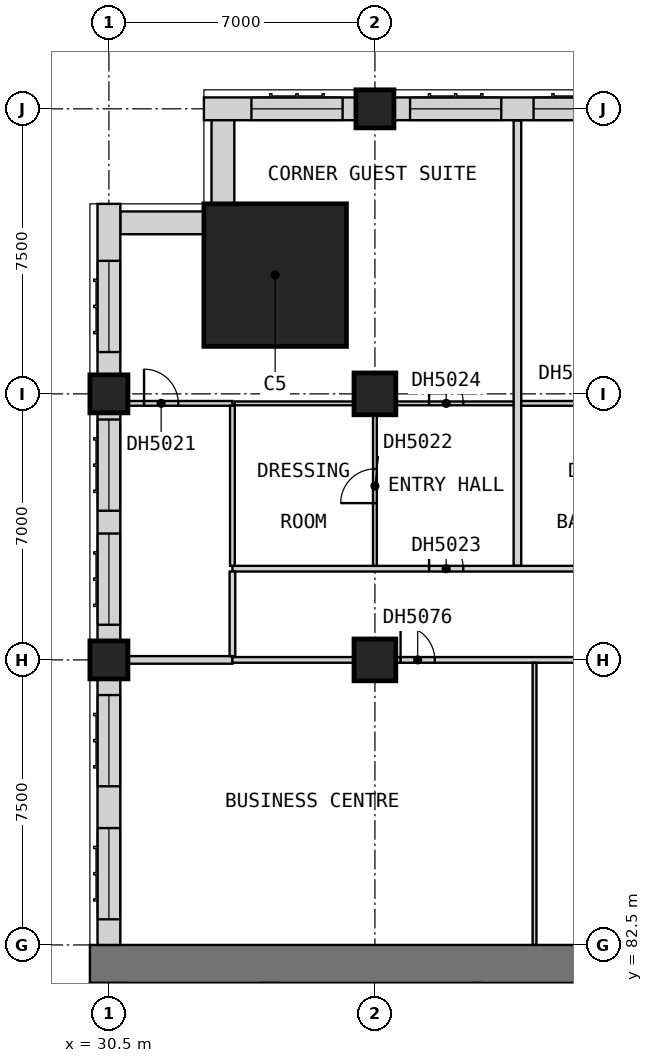
"""IFC4 building model, lengths in metres.
Left out: names, types, materials, properties, quantities, classifications, styles, units other than length and angle.
Written with IfcOpenShell. Run it as: python <this file> out.ifc"""

import sys

from ifc_helpers import new_model, si_unit, direction, frame, frame_2d, origin, origin_2d, place, context, subcontext, project, spatial, rectangle, extrude, element, fill, save


model = new_model("IFC4")
c1 = context("Model", 3, precision=1e-05, world=origin(), true_north=direction((0.0, 1.0)))
c2 = subcontext(c1, "Body", "Model", "MODEL_VIEW")
j1 = project(units=[si_unit("LENGTHUNIT", "METRE"), si_unit("PLANEANGLEUNIT", "RADIAN")], contexts=[c1])
p1 = place(None, origin())
s1 = spatial("IfcSite", under=j1, at=p1, CompositionType="ELEMENT")
p2 = place(p1, origin())
s2 = spatial("IfcBuilding", under=s1, at=p2, CompositionType="ELEMENT")
p3 = place(p2, frame((0.0, 0.0, 93.5)))
s3 = spatial("IfcBuildingStorey", under=s2, at=p3, CompositionType="ELEMENT", Elevation=93.5)
for number, where, z_axis, x_axis in (
    (1, (30.5, 90.0, 0.0), (0.0, 0.0, 1.0), (1.0, 0.0, 0.0)),
    (2, (30.5, 97.0, 0.0), (0.0, 0.0, 1.0), (1.0, 0.0, 0.0)),
):
    element("IfcColumn", number, at=place(p3, frame(where, z_axis=z_axis, x_axis=x_axis)), inside=s3, PredefinedType="COLUMN", context=c2, shape_type="SweptSolid", body=[
        extrude(rectangle(XDim=1.0, YDim=1.0, at=origin_2d()), origin(), (0.0, 0.0, 1.0), 3.6),
    ])
for number, where, z_axis, x_axis in (
    (3, (37.5, 90.0, 0.0), (0.0, 0.0, 1.0), (1.0, 0.0, 0.0)),
    (4, (37.5, 97.0, 0.0), (0.0, 0.0, 1.0), (1.0, 0.0, 0.0)),
):
    element("IfcColumn", number, at=place(p3, frame(where, z_axis=z_axis, x_axis=x_axis)), inside=s3, PredefinedType="COLUMN", context=c2, shape_type="SweptSolid", body=[
        extrude(rectangle(XDim=1.1, YDim=1.1, at=origin_2d()), origin(), (0.0, 0.0, 1.0), 3.6),
    ])
p4 = place(p3, frame((37.5, 104.5, 0.0), z_axis=(0.0, 0.0, 1.0), x_axis=(1.0, 0.0, 0.0)))
e5 = element("IfcColumn", 5, at=p4, inside=s3, PredefinedType="COLUMN", context=c2, shape_type="SweptSolid", body=[
    extrude(rectangle(XDim=1.0, YDim=1.0, at=origin_2d()), origin(), (0.0, 0.0, 1.0), 3.6),
])
p5 = place(p3, frame((34.875, 100.125, 0.0), z_axis=(0.0, 0.0, 1.0), x_axis=(1.0, 0.0, 0.0)))
e6 = element("IfcColumn", 6, at=p5, inside=s3, PredefinedType="COLUMN", context=c2, shape_type="SweptSolid", body=[
    extrude(rectangle(XDim=3.75, YDim=3.75, at=origin_2d()), origin(), (0.0, 0.0, 1.0), 3.6),
])
p6 = place(p3, frame((30.0, 82.0, 0.0), z_axis=(0.0, 0.0, 1.0), x_axis=(1.0, 0.0, 0.0)))
e7 = element("IfcWall", 7, at=p6, inside=s3, PredefinedType="SHEAR", context=c2, shape_type="SweptSolid", body=[
    extrude(rectangle(XDim=30.0, YDim=1.0, at=frame_2d((15.0, 0.0))), origin(), (0.0, 0.0, 1.0), 3.6),
])
p7 = place(p3, frame((34.75, 78.3, 0.0), z_axis=(0.0, 0.0, 1.0), x_axis=(0.0, 1.0, 0.0)))
e8 = element("IfcWall", 8, at=p7, inside=s3, PredefinedType="SHEAR", context=c2, shape_type="SweptSolid", body=[
    extrude(rectangle(XDim=3.2, YDim=0.5, at=frame_2d((1.6, 0.0))), origin(), (0.0, 0.0, 1.0), 3.6),
])
p8 = place(p3, frame((44.5, 104.5, 0.0), z_axis=(0.0, 0.0, 1.0), x_axis=(-1.0, 0.0, 0.0)))
e9 = element("IfcWall", 9, at=p8, inside=s3, PredefinedType="SOLIDWALL", context=c2, shape_type="SweptSolid", body=[
    extrude(rectangle(XDim=6.5, YDim=0.6, at=frame_2d((3.25, 0.0))), origin(), (0.0, 0.0, 1.0), 2.85),
])
p9 = place(p8, frame((3.675, 0.0, 0.8)))
e10 = element("IfcOpeningElement", 10, at=p9, cuts=e9, PredefinedType="OPENING", context=c2, shape_type="SweptSolid", body=[
    extrude(rectangle(XDim=2.4, YDim=1.8, at=frame_2d((1.2, 0.9))), frame((0.0, 0.31, 0.0), z_axis=(0.0, -1.0, 0.0), x_axis=(1.0, 0.0, 0.0)), (0.0, 0.0, 1.0), 0.62),
])
p10 = place(p8, frame((0.425, 0.0, 0.8)))
e11 = element("IfcOpeningElement", 11, at=p10, cuts=e9, PredefinedType="OPENING", context=c2, shape_type="SweptSolid", body=[
    extrude(rectangle(XDim=2.4, YDim=1.8, at=frame_2d((1.2, 0.9))), frame((0.0, 0.31, 0.0), z_axis=(0.0, -1.0, 0.0), x_axis=(1.0, 0.0, 0.0)), (0.0, 0.0, 1.0), 0.62),
])
p11 = place(p3, frame((37.0, 104.5, 0.0), z_axis=(0.0, 0.0, 1.0), x_axis=(-1.0, 0.0, 0.0)))
e12 = element("IfcWall", 12, at=p11, inside=s3, PredefinedType="SOLIDWALL", context=c2, shape_type="SweptSolid", body=[
    extrude(rectangle(XDim=4.0, YDim=0.6, at=frame_2d((2.0, 0.0))), origin(), (0.0, 0.0, 1.0), 3.35),
])
p12 = place(p11, frame((0.35, 0.0, 0.8)))
e13 = element("IfcOpeningElement", 13, at=p12, cuts=e12, PredefinedType="OPENING", context=c2, shape_type="SweptSolid", body=[
    extrude(rectangle(XDim=2.4, YDim=1.8, at=frame_2d((1.2, 0.9))), frame((0.0, 0.31, 0.0), z_axis=(0.0, -1.0, 0.0), x_axis=(1.0, 0.0, 0.0)), (0.0, 0.0, 1.0), 0.62),
])
for number, where, z_axis, x_axis in (
    (14, (33.5, 104.2, 0.0), (0.0, 0.0, 1.0), (0.0, -1.0, 0.0)),
    (15, (33.0, 101.5, 0.0), (0.0, 0.0, 1.0), (-1.0, 0.0, 0.0)),
):
    element("IfcWall", number, at=place(p3, frame(where, z_axis=z_axis, x_axis=x_axis)), inside=s3, PredefinedType="SOLIDWALL", context=c2, shape_type="SweptSolid", body=[
        extrude(rectangle(XDim=2.2, YDim=0.6, at=frame_2d((1.1, 0.0))), origin(), (0.0, 0.0, 1.0), 3.35),
    ])
p13 = place(p3, frame((30.5, 102.0, 0.0), z_axis=(0.0, 0.0, 1.0), x_axis=(0.0, -1.0, 0.0)))
e16 = element("IfcWall", 16, at=p13, inside=s3, PredefinedType="SOLIDWALL", context=c2, shape_type="SweptSolid", body=[
    extrude(rectangle(XDim=4.5, YDim=0.6, at=frame_2d((2.25, 0.0))), origin(), (0.0, 0.0, 1.0), 2.85),
])
p14 = place(p13, frame((1.5, 0.0, 0.8)))
e17 = element("IfcOpeningElement", 17, at=p14, cuts=e16, PredefinedType="OPENING", context=c2, shape_type="SweptSolid", body=[
    extrude(rectangle(XDim=2.4, YDim=1.8, at=frame_2d((1.2, 0.9))), frame((0.0, 0.31, 0.0), z_axis=(0.0, -1.0, 0.0), x_axis=(1.0, 0.0, 0.0)), (0.0, 0.0, 1.0), 0.62),
])
p15 = place(p3, frame((30.5, 96.5, 0.0), z_axis=(0.0, 0.0, 1.0), x_axis=(0.0, -1.0, 0.0)))
e18 = element("IfcWall", 18, at=p15, inside=s3, PredefinedType="SOLIDWALL", context=c2, shape_type="SweptSolid", body=[
    extrude(rectangle(XDim=6.0, YDim=0.6, at=frame_2d((3.0, 0.0))), origin(), (0.0, 0.0, 1.0), 2.85),
])
p16 = place(p15, frame((3.175, 0.0, 0.8)))
e19 = element("IfcOpeningElement", 19, at=p16, cuts=e18, PredefinedType="OPENING", context=c2, shape_type="SweptSolid", body=[
    extrude(rectangle(XDim=2.4, YDim=1.8, at=frame_2d((1.2, 0.9))), frame((0.0, 0.31, 0.0), z_axis=(0.0, -1.0, 0.0), x_axis=(1.0, 0.0, 0.0)), (0.0, 0.0, 1.0), 0.62),
])
p17 = place(p15, frame((0.175, 0.0, 0.8)))
e20 = element("IfcOpeningElement", 20, at=p17, cuts=e18, PredefinedType="OPENING", context=c2, shape_type="SweptSolid", body=[
    extrude(rectangle(XDim=2.4, YDim=1.8, at=frame_2d((1.2, 0.9))), frame((0.0, 0.31, 0.0), z_axis=(0.0, -1.0, 0.0), x_axis=(1.0, 0.0, 0.0)), (0.0, 0.0, 1.0), 0.62),
])
p18 = place(p3, frame((30.5, 89.5, 0.0), z_axis=(0.0, 0.0, 1.0), x_axis=(0.0, -1.0, 0.0)))
e21 = element("IfcWall", 21, at=p18, inside=s3, PredefinedType="SOLIDWALL", context=c2, shape_type="SweptSolid", body=[
    extrude(rectangle(XDim=7.0, YDim=0.6, at=frame_2d((3.5, 0.0))), origin(), (0.0, 0.0, 1.0), 3.35),
])
p19 = place(p18, frame((3.925, 0.0, 0.8)))
e22 = element("IfcOpeningElement", 22, at=p19, cuts=e21, PredefinedType="OPENING", context=c2, shape_type="SweptSolid", body=[
    extrude(rectangle(XDim=2.4, YDim=1.8, at=frame_2d((1.2, 0.9))), frame((0.0, 0.31, 0.0), z_axis=(0.0, -1.0, 0.0), x_axis=(1.0, 0.0, 0.0)), (0.0, 0.0, 1.0), 0.62),
])
p20 = place(p18, frame((0.425, 0.0, 0.8)))
e23 = element("IfcOpeningElement", 23, at=p20, cuts=e21, PredefinedType="OPENING", context=c2, shape_type="SweptSolid", body=[
    extrude(rectangle(XDim=2.4, YDim=1.8, at=frame_2d((1.2, 0.9))), frame((0.0, 0.31, 0.0), z_axis=(0.0, -1.0, 0.0), x_axis=(1.0, 0.0, 0.0)), (0.0, 0.0, 1.0), 0.62),
])
p21 = place(p3, frame((30.0, 90.0, 0.0), z_axis=(0.0, 0.0, 1.0), x_axis=(1.0, 0.0, 0.0)))
e24 = element("IfcWall", 24, at=p21, inside=s3, PredefinedType="PARTITIONING", context=c2, shape_type="SweptSolid", body=[
    extrude(rectangle(XDim=3.75, YDim=0.2, at=frame_2d((1.875, 0.0))), origin(), (0.0, 0.0, 1.0), 3.35),
])
p22 = place(p3, frame((41.25, 92.475, 0.0), z_axis=(0.0, 0.0, 1.0), x_axis=(0.0, 1.0, 0.0)))
e25 = element("IfcWall", 25, at=p22, inside=s3, PredefinedType="PARTITIONING", context=c2, shape_type="SweptSolid", body=[
    extrude(rectangle(XDim=11.715, YDim=0.2, at=frame_2d((5.857, 0.0))), origin(), (0.0, 0.0, 1.0), 3.35),
])
p23 = place(p3, frame((33.75, 90.0, 0.0), z_axis=(0.0, 0.0, 1.0), x_axis=(1.0, 0.0, 0.0)))
e26 = element("IfcWall", 26, at=p23, inside=s3, PredefinedType="PARTITIONING", context=c2, shape_type="SweptSolid", body=[
    extrude(rectangle(XDim=41.25, YDim=0.15, at=frame_2d((20.625, 0.0))), origin(), (0.0, 0.0, 1.0), 3.35),
])
p24 = place(p23, frame((4.425, 0.0, 0.0)))
e27 = element("IfcOpeningElement", 27, at=p24, cuts=e26, PredefinedType="OPENING", context=c2, shape_type="SweptSolid", body=[
    extrude(rectangle(XDim=0.9, YDim=2.1, at=frame_2d((0.45, 1.05))), frame((0.0, 0.085, 0.0), z_axis=(0.0, -1.0, 0.0), x_axis=(1.0, 0.0, 0.0)), (0.0, 0.0, 1.0), 0.17),
])
p25 = place(p23, frame((15.075, 0.0, 0.0)))
e28 = element("IfcOpeningElement", 28, at=p25, cuts=e26, PredefinedType="OPENING", context=c2, shape_type="SweptSolid", body=[
    extrude(rectangle(XDim=0.9, YDim=2.1, at=frame_2d((0.45, 1.05))), frame((0.0, 0.085, 0.0), z_axis=(0.0, -1.0, 0.0), x_axis=(1.0, 0.0, 0.0)), (0.0, 0.0, 1.0), 0.17),
])
p26 = place(p23, frame((27.975, 0.0, 0.0)))
e29 = element("IfcOpeningElement", 29, at=p26, cuts=e26, PredefinedType="OPENING", context=c2, shape_type="SweptSolid", body=[
    extrude(rectangle(XDim=0.9, YDim=2.1, at=frame_2d((0.45, 1.05))), frame((0.0, 0.085, 0.0), z_axis=(0.0, -1.0, 0.0), x_axis=(1.0, 0.0, 0.0)), (0.0, 0.0, 1.0), 0.17),
])
p27 = place(p3, frame((33.75, 92.4, 0.0), z_axis=(0.0, 0.0, 1.0), x_axis=(1.0, 0.0, 0.0)))
e30 = element("IfcWall", 30, at=p27, inside=s3, PredefinedType="PARTITIONING", context=c2, shape_type="SweptSolid", body=[
    extrude(rectangle(XDim=43.65, YDim=0.15, at=frame_2d((21.825, 0.0))), origin(), (0.0, 0.0, 1.0), 3.35),
])
p28 = place(p27, frame((5.175, 0.0, 0.0)))
e31 = element("IfcOpeningElement", 31, at=p28, cuts=e30, PredefinedType="OPENING", context=c2, shape_type="SweptSolid", body=[
    extrude(rectangle(XDim=0.9, YDim=2.1, at=frame_2d((0.45, 1.05))), frame((0.0, 0.085, 0.0), z_axis=(0.0, -1.0, 0.0), x_axis=(1.0, 0.0, 0.0)), (0.0, 0.0, 1.0), 0.17),
])
p29 = place(p27, frame((13.05, 0.0, 0.0)))
e32 = element("IfcOpeningElement", 32, at=p29, cuts=e30, PredefinedType="OPENING", context=c2, shape_type="SweptSolid", body=[
    extrude(rectangle(XDim=0.9, YDim=2.1, at=frame_2d((0.45, 1.05))), frame((0.0, 0.085, 0.0), z_axis=(0.0, -1.0, 0.0), x_axis=(1.0, 0.0, 0.0)), (0.0, 0.0, 1.0), 0.17),
])
p30 = place(p27, frame((17.363, 0.0, 0.0)))
e33 = element("IfcOpeningElement", 33, at=p30, cuts=e30, PredefinedType="OPENING", context=c2, shape_type="SweptSolid", body=[
    extrude(rectangle(XDim=0.9, YDim=2.1, at=frame_2d((0.45, 1.05))), frame((0.0, 0.085, 0.0), z_axis=(0.0, -1.0, 0.0), x_axis=(1.0, 0.0, 0.0)), (0.0, 0.0, 1.0), 0.17),
])
p31 = place(p27, frame((24.3, 0.0, 0.0)))
e34 = element("IfcOpeningElement", 34, at=p31, cuts=e30, PredefinedType="OPENING", context=c2, shape_type="SweptSolid", body=[
    extrude(rectangle(XDim=0.9, YDim=2.1, at=frame_2d((0.45, 1.05))), frame((0.0, 0.085, 0.0), z_axis=(0.0, -1.0, 0.0), x_axis=(1.0, 0.0, 0.0)), (0.0, 0.0, 1.0), 0.17),
])
p32 = place(p27, frame((28.613, 0.0, 0.0)))
e35 = element("IfcOpeningElement", 35, at=p32, cuts=e30, PredefinedType="OPENING", context=c2, shape_type="SweptSolid", body=[
    extrude(rectangle(XDim=0.9, YDim=2.1, at=frame_2d((0.45, 1.05))), frame((0.0, 0.085, 0.0), z_axis=(0.0, -1.0, 0.0), x_axis=(1.0, 0.0, 0.0)), (0.0, 0.0, 1.0), 0.17),
])
p33 = place(p27, frame((32.363, 0.0, 0.0)))
e36 = element("IfcOpeningElement", 36, at=p33, cuts=e30, PredefinedType="OPENING", context=c2, shape_type="SweptSolid", body=[
    extrude(rectangle(XDim=0.9, YDim=2.1, at=frame_2d((0.45, 1.05))), frame((0.0, 0.085, 0.0), z_axis=(0.0, -1.0, 0.0), x_axis=(1.0, 0.0, 0.0)), (0.0, 0.0, 1.0), 0.17),
])
p34 = place(p27, frame((39.438, 0.0, 0.0)))
e37 = element("IfcOpeningElement", 37, at=p34, cuts=e30, PredefinedType="OPENING", context=c2, shape_type="SweptSolid", body=[
    extrude(rectangle(XDim=1.0, YDim=2.1, at=frame_2d((0.5, 1.05))), frame((0.0, 0.085, 0.0), z_axis=(0.0, -1.0, 0.0), x_axis=(1.0, 0.0, 0.0)), (0.0, 0.0, 1.0), 0.17),
])
p35 = place(p27, frame((42.0, 0.0, 0.0)))
e38 = element("IfcOpeningElement", 38, at=p35, cuts=e30, PredefinedType="OPENING", context=c2, shape_type="SweptSolid", body=[
    extrude(rectangle(XDim=0.9, YDim=2.1, at=frame_2d((0.45, 1.05))), frame((0.0, 0.085, 0.0), z_axis=(0.0, -1.0, 0.0), x_axis=(1.0, 0.0, 0.0)), (0.0, 0.0, 1.0), 0.17),
])
p36 = place(p3, frame((33.75, 90.1, 0.0), z_axis=(0.0, 0.0, 1.0), x_axis=(0.0, 1.0, 0.0)))
e39 = element("IfcWall", 39, at=p36, inside=s3, PredefinedType="PARTITIONING", context=c2, shape_type="SweptSolid", body=[
    extrude(rectangle(XDim=2.225, YDim=0.15, at=frame_2d((1.112, 0.0))), origin(), (0.0, 0.0, 1.0), 3.35),
])
p37 = place(p3, frame((33.812, 96.75, 0.0), z_axis=(0.0, 0.0, 1.0), x_axis=(1.0, 0.0, 0.0)))
e40 = element("IfcWall", 40, at=p37, inside=s3, PredefinedType="PARTITIONING", context=c2, shape_type="SweptSolid", body=[
    extrude(rectangle(XDim=7.337, YDim=0.1, at=frame_2d((3.669, 0.0))), origin(), (0.0, 0.0, 1.0), 3.35),
])
p38 = place(p37, frame((5.113, 0.0, 0.0)))
e41 = element("IfcOpeningElement", 41, at=p38, cuts=e40, PredefinedType="OPENING", context=c2, shape_type="SweptSolid", body=[
    extrude(rectangle(XDim=0.9, YDim=2.1, at=frame_2d((0.45, 1.05))), frame((0.0, 0.06, 0.0), z_axis=(0.0, -1.0, 0.0), x_axis=(1.0, 0.0, 0.0)), (0.0, 0.0, 1.0), 0.12),
])
p39 = place(p3, frame((37.5, 92.475, 0.0), z_axis=(0.0, 0.0, 1.0), x_axis=(0.0, 1.0, 0.0)))
e42 = element("IfcWall", 42, at=p39, inside=s3, PredefinedType="PARTITIONING", context=c2, shape_type="SweptSolid", body=[
    extrude(rectangle(XDim=4.225, YDim=0.1, at=frame_2d((2.112, 0.0))), origin(), (0.0, 0.0, 1.0), 3.35),
])
p40 = place(p39, frame((1.65, 0.0, 0.0)))
e43 = element("IfcOpeningElement", 43, at=p40, cuts=e42, PredefinedType="OPENING", context=c2, shape_type="SweptSolid", body=[
    extrude(rectangle(XDim=0.9, YDim=2.1, at=frame_2d((0.45, 1.05))), frame((0.0, 0.06, 0.0), z_axis=(0.0, -1.0, 0.0), x_axis=(1.0, 0.0, 0.0)), (0.0, 0.0, 1.0), 0.12),
])
p41 = place(p3, frame((41.7, 82.5, 0.0), z_axis=(0.0, 0.0, 1.0), x_axis=(0.0, 1.0, 0.0)))
e44 = element("IfcWall", 44, at=p41, inside=s3, PredefinedType="PARTITIONING", context=c2, shape_type="SweptSolid", body=[
    extrude(rectangle(XDim=7.425, YDim=0.1, at=frame_2d((3.712, 0.0))), origin(), (0.0, 0.0, 1.0), 3.35),
])
p42 = place(p3, frame((30.0, 96.75, 0.0), z_axis=(0.0, 0.0, 1.0), x_axis=(1.0, 0.0, 0.0)))
e45 = element("IfcWall", 45, at=p42, inside=s3, PredefinedType="PARTITIONING", context=c2, shape_type="SweptSolid", body=[
    extrude(rectangle(XDim=3.75, YDim=0.125, at=frame_2d((1.875, 0.0))), origin(), (0.0, 0.0, 1.0), 3.35),
])
p43 = place(p42, frame((1.425, 0.0, 0.0)))
e46 = element("IfcOpeningElement", 46, at=p43, cuts=e45, PredefinedType="OPENING", context=c2, shape_type="SweptSolid", body=[
    extrude(rectangle(XDim=0.9, YDim=2.1, at=frame_2d((0.45, 1.05))), frame((0.0, 0.073, 0.0), z_axis=(0.0, -1.0, 0.0), x_axis=(1.0, 0.0, 0.0)), (0.0, 0.0, 1.0), 0.145),
])
p44 = place(p3, frame((41.35, 96.75, 0.0), z_axis=(0.0, 0.0, 1.0), x_axis=(1.0, 0.0, 0.0)))
e47 = element("IfcWall", 47, at=p44, inside=s3, PredefinedType="PARTITIONING", context=c2, shape_type="SweptSolid", body=[
    extrude(rectangle(XDim=4.4, YDim=0.125, at=frame_2d((2.2, 0.0))), origin(), (0.0, 0.0, 1.0), 3.35),
])
p45 = place(p44, frame((1.7, 0.0, 0.0)))
e48 = element("IfcOpeningElement", 48, at=p45, cuts=e47, PredefinedType="OPENING", context=c2, shape_type="SweptSolid", body=[
    extrude(rectangle(XDim=0.9, YDim=2.1, at=frame_2d((0.45, 1.05))), frame((0.0, 0.073, 0.0), z_axis=(0.0, -1.0, 0.0), x_axis=(1.0, 0.0, 0.0)), (0.0, 0.0, 1.0), 0.145),
])
p46 = place(p3, frame((33.75, 92.475, 0.0), z_axis=(0.0, 0.0, 1.0), x_axis=(0.0, 1.0, 0.0)))
e49 = element("IfcWall", 49, at=p46, inside=s3, PredefinedType="PARTITIONING", context=c2, shape_type="SweptSolid", body=[
    extrude(rectangle(XDim=4.212, YDim=0.125, at=frame_2d((2.106, 0.0))), origin(), (0.0, 0.0, 1.0), 3.35),
])
p47 = place(p9, origin())
e50 = element("IfcWindow", 50, at=p47, inside=s3, PartitioningType="SINGLE_PANEL", PredefinedType="WINDOW", context=c2, shape_type="SweptSolid", body=[
    extrude(rectangle(XDim=2.4, YDim=1.8, at=frame_2d((1.2, 0.9))), frame((0.0, -0.07, 0.0), z_axis=(0.0, -1.0, 0.0), x_axis=(1.0, 0.0, 0.0)), (0.0, 0.0, 1.0), 0.06),
])
fill(e10, e50)
p48 = place(p10, origin())
e51 = element("IfcWindow", 51, at=p48, inside=s3, PartitioningType="SINGLE_PANEL", PredefinedType="WINDOW", context=c2, shape_type="SweptSolid", body=[
    extrude(rectangle(XDim=2.4, YDim=1.8, at=frame_2d((1.2, 0.9))), frame((0.0, -0.07, 0.0), z_axis=(0.0, -1.0, 0.0), x_axis=(1.0, 0.0, 0.0)), (0.0, 0.0, 1.0), 0.06),
])
fill(e11, e51)
p49 = place(p12, origin())
e52 = element("IfcWindow", 52, at=p49, inside=s3, PartitioningType="SINGLE_PANEL", PredefinedType="WINDOW", context=c2, shape_type="SweptSolid", body=[
    extrude(rectangle(XDim=2.4, YDim=1.8, at=frame_2d((1.2, 0.9))), frame((0.0, -0.07, 0.0), z_axis=(0.0, -1.0, 0.0), x_axis=(1.0, 0.0, 0.0)), (0.0, 0.0, 1.0), 0.06),
])
fill(e13, e52)
p50 = place(p14, origin())
e53 = element("IfcWindow", 53, at=p50, inside=s3, PartitioningType="SINGLE_PANEL", PredefinedType="WINDOW", context=c2, shape_type="SweptSolid", body=[
    extrude(rectangle(XDim=2.4, YDim=1.8, at=frame_2d((1.2, 0.9))), frame((0.0, -0.07, 0.0), z_axis=(0.0, -1.0, 0.0), x_axis=(1.0, 0.0, 0.0)), (0.0, 0.0, 1.0), 0.06),
])
fill(e17, e53)
p51 = place(p16, origin())
e54 = element("IfcWindow", 54, at=p51, inside=s3, PartitioningType="SINGLE_PANEL", PredefinedType="WINDOW", context=c2, shape_type="SweptSolid", body=[
    extrude(rectangle(XDim=2.4, YDim=1.8, at=frame_2d((1.2, 0.9))), frame((0.0, -0.07, 0.0), z_axis=(0.0, -1.0, 0.0), x_axis=(1.0, 0.0, 0.0)), (0.0, 0.0, 1.0), 0.06),
])
fill(e19, e54)
p52 = place(p17, origin())
e55 = element("IfcWindow", 55, at=p52, inside=s3, PartitioningType="SINGLE_PANEL", PredefinedType="WINDOW", context=c2, shape_type="SweptSolid", body=[
    extrude(rectangle(XDim=2.4, YDim=1.8, at=frame_2d((1.2, 0.9))), frame((0.0, -0.07, 0.0), z_axis=(0.0, -1.0, 0.0), x_axis=(1.0, 0.0, 0.0)), (0.0, 0.0, 1.0), 0.06),
])
fill(e20, e55)
p53 = place(p19, origin())
e56 = element("IfcWindow", 56, at=p53, inside=s3, PartitioningType="SINGLE_PANEL", PredefinedType="WINDOW", context=c2, shape_type="SweptSolid", body=[
    extrude(rectangle(XDim=2.4, YDim=1.8, at=frame_2d((1.2, 0.9))), frame((0.0, -0.07, 0.0), z_axis=(0.0, -1.0, 0.0), x_axis=(1.0, 0.0, 0.0)), (0.0, 0.0, 1.0), 0.06),
])
fill(e22, e56)
p54 = place(p20, origin())
e57 = element("IfcWindow", 57, at=p54, inside=s3, PartitioningType="SINGLE_PANEL", PredefinedType="WINDOW", context=c2, shape_type="SweptSolid", body=[
    extrude(rectangle(XDim=2.4, YDim=1.8, at=frame_2d((1.2, 0.9))), frame((0.0, -0.07, 0.0), z_axis=(0.0, -1.0, 0.0), x_axis=(1.0, 0.0, 0.0)), (0.0, 0.0, 1.0), 0.06),
])
fill(e23, e57)
p55 = place(p43, origin())
e58 = element("IfcDoor", 58, at=p55, inside=s3, OperationType="SINGLE_SWING_RIGHT", PredefinedType="DOOR", context=c2, shape_type="SweptSolid", body=[
    extrude(rectangle(XDim=0.9, YDim=2.1, at=frame_2d((0.45, 1.05))), frame((0.0, 0.025, 0.0), z_axis=(0.0, -1.0, 0.0), x_axis=(1.0, 0.0, 0.0)), (0.0, 0.0, 1.0), 0.05),
])
fill(e46, e58)
p56 = place(p40, origin())
e59 = element("IfcDoor", 59, at=p56, inside=s3, OperationType="SINGLE_SWING_RIGHT", PredefinedType="DOOR", context=c2, shape_type="SweptSolid", body=[
    extrude(rectangle(XDim=0.9, YDim=2.1, at=frame_2d((0.45, 1.05))), frame((0.0, 0.025, 0.0), z_axis=(0.0, -1.0, 0.0), x_axis=(1.0, 0.0, 0.0)), (0.0, 0.0, 1.0), 0.05),
])
fill(e43, e59)
p57 = place(p28, origin())
e60 = element("IfcDoor", 60, at=p57, inside=s3, OperationType="SINGLE_SWING_LEFT", PredefinedType="DOOR", context=c2, shape_type="SweptSolid", body=[
    extrude(rectangle(XDim=0.9, YDim=2.1, at=frame_2d((0.45, 1.05))), frame((0.0, 0.025, 0.0), z_axis=(0.0, -1.0, 0.0), x_axis=(1.0, 0.0, 0.0)), (0.0, 0.0, 1.0), 0.05),
])
fill(e31, e60)
p58 = place(p38, origin())
e61 = element("IfcDoor", 61, at=p58, inside=s3, OperationType="SINGLE_SWING_RIGHT", PredefinedType="DOOR", context=c2, shape_type="SweptSolid", body=[
    extrude(rectangle(XDim=0.9, YDim=2.1, at=frame_2d((0.45, 1.05))), frame((0.0, 0.025, 0.0), z_axis=(0.0, -1.0, 0.0), x_axis=(1.0, 0.0, 0.0)), (0.0, 0.0, 1.0), 0.05),
])
fill(e41, e61)
p59 = place(p24, origin())
e62 = element("IfcDoor", 62, at=p59, inside=s3, OperationType="SINGLE_SWING_LEFT", PredefinedType="DOOR", context=c2, shape_type="SweptSolid", body=[
    extrude(rectangle(XDim=0.9, YDim=2.1, at=frame_2d((0.45, 1.05))), frame((0.0, 0.025, 0.0), z_axis=(0.0, -1.0, 0.0), x_axis=(1.0, 0.0, 0.0)), (0.0, 0.0, 1.0), 0.05),
])
fill(e27, e62)
save(model, sys.argv[1])
